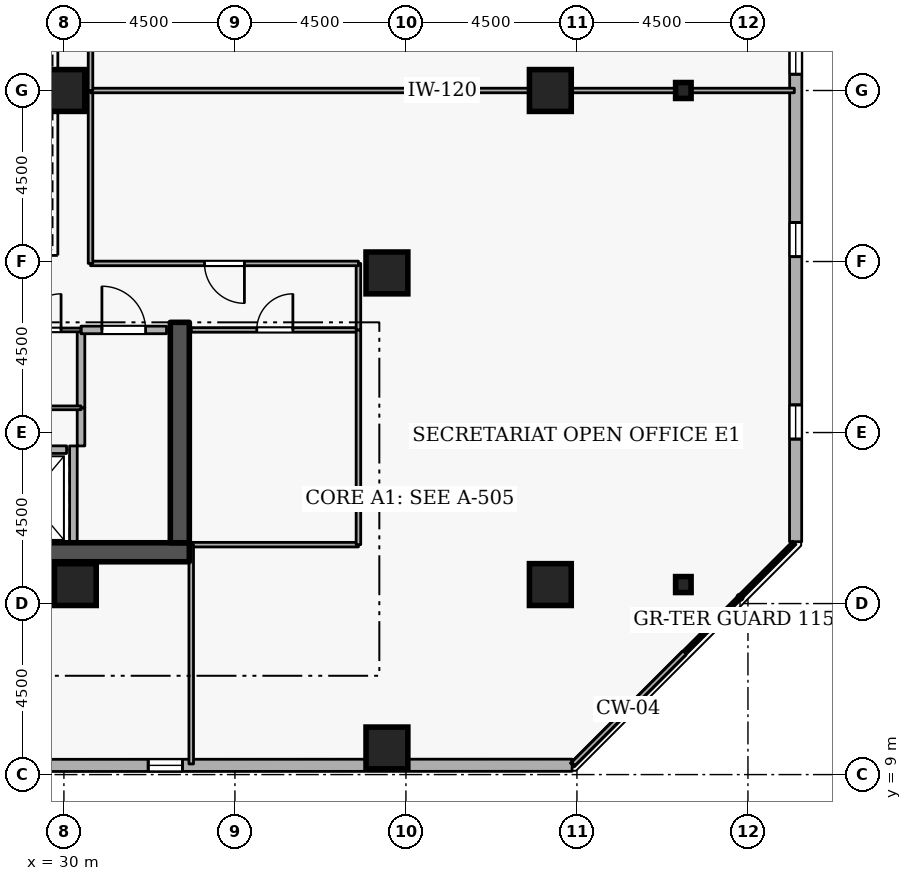
"""IFC4 building model, lengths in metres.
Left out: names, types, materials, properties, quantities, classifications, styles, units other than length and angle.
Written with IfcOpenShell. Run it as: python <this file> out.ifc"""

import sys

from ifc_helpers import new_model, si_unit, direction, frame, frame_2d, origin, origin_2d, place, context, subcontext, project, spatial, rectangle, i_section, extrude, element, fill, save


model = new_model("IFC4")
c1 = context("Model", 3, precision=1e-05, world=origin(), true_north=direction((0.0, 1.0)))
c2 = subcontext(c1, "Body", "Model", "MODEL_VIEW")
j1 = project(units=[si_unit("LENGTHUNIT", "METRE"), si_unit("PLANEANGLEUNIT", "RADIAN")], contexts=[c1])
p1 = place(None, origin())
s1 = spatial("IfcSite", under=j1, at=p1, CompositionType="ELEMENT")
p2 = place(p1, origin())
s2 = spatial("IfcBuilding", under=s1, at=p2, CompositionType="ELEMENT")
p3 = place(p2, frame((0.0, 0.0, 178.5)))
s3 = spatial("IfcBuildingStorey", under=s2, at=p3, CompositionType="ELEMENT", Elevation=178.5)
p4 = place(p3, frame((17.7, 14.85, 0.0), z_axis=(0.0, 0.0, 1.0), x_axis=(1.0, 0.0, 0.0)))
e1 = element("IfcWall", 1, at=p4, inside=s3, PredefinedType="SHEAR", context=c2, shape_type="SweptSolid", body=[
    extrude(rectangle(XDim=15.6, YDim=0.5, at=frame_2d((7.8, 0.0))), origin(), (0.0, 0.0, 1.0), 3.6),
])
p5 = place(p3, frame((33.05, 15.1, 0.0), z_axis=(0.0, 0.0, 1.0), x_axis=(0.0, 1.0, 0.0)))
e2 = element("IfcWall", 2, at=p5, inside=s3, PredefinedType="SHEAR", context=c2, shape_type="SweptSolid", body=[
    extrude(rectangle(XDim=5.8, YDim=0.5, at=frame_2d((2.9, 0.0))), origin(), (0.0, 0.0, 1.0), 3.6),
])
for number, where, z_axis, x_axis in (
    (3, (38.5, 9.7, 0.0), (0.0, 0.0, 1.0), (1.0, 0.0, 0.0)),
    (4, (42.8, 14.0, 0.0), (0.0, 0.0, 1.0), (1.0, 0.0, 0.0)),
    (5, (42.8, 27.0, 0.0), (0.0, 0.0, 1.0), (1.0, 0.0, 0.0)),
    (6, (38.5, 22.2, 0.0), (0.0, 0.0, 1.0), (1.0, 0.0, 0.0)),
    (7, (30.3, 14.0, 0.0), (0.0, 0.0, 1.0), (1.0, 0.0, 0.0)),
    (8, (30.0, 27.0, 0.0), (0.0, 0.0, 1.0), (1.0, 0.0, 0.0)),
):
    element("IfcColumn", number, at=place(p3, frame(where, z_axis=z_axis, x_axis=x_axis)), inside=s3, PredefinedType="COLUMN", context=c2, shape_type="SweptSolid", body=[
        extrude(rectangle(XDim=1.1, YDim=1.1, at=origin_2d()), origin(), (0.0, 0.0, 1.0), 3.6),
    ])
for number, where, z_axis, x_axis in (
    (9, (46.3, 14.0, 0.0), (0.0, 0.0, 1.0), (1.0, 0.0, 0.0)),
    (10, (46.3, 27.0, 0.0), (0.0, 0.0, 1.0), (1.0, 0.0, 0.0)),
):
    element("IfcColumn", number, at=place(p3, frame(where, z_axis=z_axis, x_axis=x_axis)), inside=s3, PredefinedType="COLUMN", context=c2, shape_type="SweptSolid", body=[
        extrude(i_section(OverallWidth=0.407, OverallDepth=0.419, WebThickness=0.031, FlangeThickness=0.049, FilletRadius=0.015, at=origin_2d()), origin(), (0.0, 0.0, 1.0), 3.6),
    ])
p6 = place(p3, frame((10.319, 9.235, 0.0), z_axis=(0.0, 0.0, 1.0), x_axis=(0.999999944762, 0.000332378036, 0.0)))
e11 = element("IfcWall", 11, at=p6, inside=s3, PredefinedType="STANDARD", context=c2, shape_type="SweptSolid", body=[
    extrude(rectangle(XDim=33.054, YDim=0.32, at=frame_2d((16.527, 0.0))), origin(), (0.0, 0.0, 1.0), 2.7),
])
p7 = place(p6, frame((7.5, 0.0, 0.72)))
e12 = element("IfcOpeningElement", 12, at=p7, cuts=e11, PredefinedType="OPENING", context=c2, shape_type="SweptSolid", body=[
    extrude(rectangle(XDim=0.9, YDim=1.75, at=frame_2d((0.45, 0.875))), frame((0.0, 0.17, 0.0), z_axis=(0.0, -1.0, 0.0), x_axis=(1.0, 0.0, 0.0)), (0.0, 0.0, 1.0), 0.34),
])
p8 = place(p6, frame((12.3, 0.0, 0.72)))
e13 = element("IfcOpeningElement", 13, at=p8, cuts=e11, PredefinedType="OPENING", context=c2, shape_type="SweptSolid", body=[
    extrude(rectangle(XDim=0.9, YDim=1.75, at=frame_2d((0.45, 0.875))), frame((0.0, 0.17, 0.0), z_axis=(0.0, -1.0, 0.0), x_axis=(1.0, 0.0, 0.0)), (0.0, 0.0, 1.0), 0.34),
])
p9 = place(p6, frame((17.1, 0.0, 0.72)))
e14 = element("IfcOpeningElement", 14, at=p9, cuts=e11, PredefinedType="OPENING", context=c2, shape_type="SweptSolid", body=[
    extrude(rectangle(XDim=0.9, YDim=1.75, at=frame_2d((0.45, 0.875))), frame((0.0, 0.17, 0.0), z_axis=(0.0, -1.0, 0.0), x_axis=(1.0, 0.0, 0.0)), (0.0, 0.0, 1.0), 0.34),
])
p10 = place(p6, frame((21.9, 0.0, 0.72)))
e15 = element("IfcOpeningElement", 15, at=p10, cuts=e11, PredefinedType="OPENING", context=c2, shape_type="SweptSolid", body=[
    extrude(rectangle(XDim=0.9, YDim=1.75, at=frame_2d((0.45, 0.875))), frame((0.0, 0.17, 0.0), z_axis=(0.0, -1.0, 0.0), x_axis=(1.0, 0.0, 0.0)), (0.0, 0.0, 1.0), 0.34),
])
p11 = place(p3, frame((49.254, 15.128, 0.0), z_axis=(0.0, 0.0, 1.0), x_axis=(0.000332378036, 0.999999944762, 0.0)))
e16 = element("IfcWall", 16, at=p11, inside=s3, PredefinedType="STANDARD", context=c2, shape_type="SweptSolid", body=[
    extrude(rectangle(XDim=33.054, YDim=0.32, at=frame_2d((16.527, 0.0))), origin(), (0.0, 0.0, 1.0), 2.7),
])
p12 = place(p11, frame((2.7, 0.0, 0.72)))
e17 = element("IfcOpeningElement", 17, at=p12, cuts=e16, PredefinedType="OPENING", context=c2, shape_type="SweptSolid", body=[
    extrude(rectangle(XDim=0.9, YDim=1.75, at=frame_2d((0.45, 0.875))), frame((0.0, 0.17, 0.0), z_axis=(0.0, -1.0, 0.0), x_axis=(1.0, 0.0, 0.0)), (0.0, 0.0, 1.0), 0.34),
])
p13 = place(p11, frame((7.5, 0.0, 0.72)))
e18 = element("IfcOpeningElement", 18, at=p13, cuts=e16, PredefinedType="OPENING", context=c2, shape_type="SweptSolid", body=[
    extrude(rectangle(XDim=0.9, YDim=1.75, at=frame_2d((0.45, 0.875))), frame((0.0, 0.17, 0.0), z_axis=(0.0, -1.0, 0.0), x_axis=(1.0, 0.0, 0.0)), (0.0, 0.0, 1.0), 0.34),
])
p14 = place(p11, frame((12.3, 0.0, 0.72)))
e19 = element("IfcOpeningElement", 19, at=p14, cuts=e16, PredefinedType="OPENING", context=c2, shape_type="SweptSolid", body=[
    extrude(rectangle(XDim=0.9, YDim=1.75, at=frame_2d((0.45, 0.875))), frame((0.0, 0.17, 0.0), z_axis=(0.0, -1.0, 0.0), x_axis=(1.0, 0.0, 0.0)), (0.0, 0.0, 1.0), 0.34),
])
p15 = place(p11, frame((17.1, 0.0, 0.72)))
e20 = element("IfcOpeningElement", 20, at=p15, cuts=e16, PredefinedType="OPENING", context=c2, shape_type="SweptSolid", body=[
    extrude(rectangle(XDim=0.9, YDim=1.75, at=frame_2d((0.45, 0.875))), frame((0.0, 0.17, 0.0), z_axis=(0.0, -1.0, 0.0), x_axis=(1.0, 0.0, 0.0)), (0.0, 0.0, 1.0), 0.34),
])
p16 = place(p11, frame((21.9, 0.0, 0.72)))
e21 = element("IfcOpeningElement", 21, at=p16, cuts=e16, PredefinedType="OPENING", context=c2, shape_type="SweptSolid", body=[
    extrude(rectangle(XDim=0.9, YDim=1.75, at=frame_2d((0.45, 0.875))), frame((0.0, 0.17, 0.0), z_axis=(0.0, -1.0, 0.0), x_axis=(1.0, 0.0, 0.0)), (0.0, 0.0, 1.0), 0.34),
])
p17 = place(p11, frame((26.7, 0.0, 0.72)))
e22 = element("IfcOpeningElement", 22, at=p17, cuts=e16, PredefinedType="OPENING", context=c2, shape_type="SweptSolid", body=[
    extrude(rectangle(XDim=0.9, YDim=1.75, at=frame_2d((0.45, 0.875))), frame((0.0, 0.17, 0.0), z_axis=(0.0, -1.0, 0.0), x_axis=(1.0, 0.0, 0.0)), (0.0, 0.0, 1.0), 0.34),
])
p18 = place(p3, frame((28.08, 17.55, 0.0), z_axis=(0.0, 0.0, 1.0), x_axis=(1.0, 0.0, 0.0)))
e23 = element("IfcWall", 23, at=p18, inside=s3, PredefinedType="STANDARD", context=c2, shape_type="SweptSolid", body=[
    extrude(rectangle(XDim=1.99, YDim=0.2, at=frame_2d((0.995, 0.0))), origin(), (0.0, 0.0, 1.0), 3.34),
])
p19 = place(p18, frame((0.485, 0.0, 0.0)))
e24 = element("IfcOpeningElement", 24, at=p19, cuts=e23, PredefinedType="OPENING", context=c2, shape_type="SweptSolid", body=[
    extrude(rectangle(XDim=1.02, YDim=2.06, at=frame_2d((0.51, 1.03))), frame((0.0, 0.11, 0.0), z_axis=(0.0, -1.0, 0.0), x_axis=(1.0, 0.0, 0.0)), (0.0, 0.0, 1.0), 0.22),
])
p20 = place(p3, frame((30.25, 15.112, 0.0), z_axis=(0.0, 0.0, 1.0), x_axis=(0.0, 1.0, 0.0)))
e25 = element("IfcWall", 25, at=p20, inside=s3, PredefinedType="STANDARD", context=c2, shape_type="SweptSolid", body=[
    extrude(rectangle(XDim=2.536, YDim=0.2, at=frame_2d((1.268, 0.0))), origin(), (0.0, 0.0, 1.0), 3.34),
])
p21 = place(p3, frame((30.45, 17.648, 0.0), z_axis=(0.0, 0.0, 1.0), x_axis=(0.0, 1.0, 0.0)))
e26 = element("IfcWall", 26, at=p21, inside=s3, PredefinedType="STANDARD", context=c2, shape_type="SweptSolid", body=[
    extrude(rectangle(XDim=1.002, YDim=0.2, at=frame_2d((0.501, 0.0))), origin(), (0.0, 0.0, 1.0), 3.34),
])
p22 = place(p3, frame((30.45, 18.65, 0.0), z_axis=(0.0, 0.0, 1.0), x_axis=(0.0, 1.0, 0.0)))
e27 = element("IfcWall", 27, at=p22, inside=s3, PredefinedType="STANDARD", context=c2, shape_type="SweptSolid", body=[
    extrude(rectangle(XDim=2.05, YDim=0.2, at=frame_2d((1.025, 0.0))), origin(), (0.0, 0.0, 1.0), 3.34),
])
p23 = place(p3, frame((30.45, 20.7, 0.0), z_axis=(0.0, 0.0, 1.0), x_axis=(1.0, 0.0, 0.0)))
e28 = element("IfcWall", 28, at=p23, inside=s3, PredefinedType="STANDARD", context=c2, shape_type="SweptSolid", body=[
    extrude(rectangle(XDim=2.25, YDim=0.2, at=frame_2d((1.125, 0.0))), origin(), (0.0, 0.0, 1.0), 3.34),
])
p24 = place(p23, frame((0.55, 0.0, 0.0)))
e29 = element("IfcOpeningElement", 29, at=p24, cuts=e28, PredefinedType="OPENING", context=c2, shape_type="SweptSolid", body=[
    extrude(rectangle(XDim=1.15, YDim=2.1, at=frame_2d((0.575, 1.05))), frame((0.0, 0.11, 0.0), z_axis=(0.0, -1.0, 0.0), x_axis=(1.0, 0.0, 0.0)), (0.0, 0.0, 1.0), 0.22),
])
p25 = place(p3, frame((30.45, 18.65, 0.0), z_axis=(0.0, 0.0, 1.0), x_axis=(-1.0, 0.0, 0.0)))
e30 = element("IfcWall", 30, at=p25, inside=s3, PredefinedType="PARTITIONING", context=c2, shape_type="SweptSolid", body=[
    extrude(rectangle(XDim=2.0, YDim=0.1, at=frame_2d((1.0, 0.0))), origin(), (0.0, 0.0, 1.0), 3.34),
])
p26 = place(p3, frame((28.45, 20.7, 0.0), z_axis=(0.0, 0.0, 1.0), x_axis=(1.0, 0.0, 0.0)))
e31 = element("IfcWall", 31, at=p26, inside=s3, PredefinedType="PARTITIONING", context=c2, shape_type="SweptSolid", body=[
    extrude(rectangle(XDim=2.0, YDim=0.1, at=frame_2d((1.0, 0.0))), origin(), (0.0, 0.0, 1.0), 3.34),
])
p27 = place(p26, frame((0.525, 0.0, 0.0)))
e32 = element("IfcOpeningElement", 32, at=p27, cuts=e31, PredefinedType="OPENING", context=c2, shape_type="SweptSolid", body=[
    extrude(rectangle(XDim=0.95, YDim=2.1, at=frame_2d((0.475, 1.05))), frame((0.0, 0.06, 0.0), z_axis=(0.0, -1.0, 0.0), x_axis=(1.0, 0.0, 0.0)), (0.0, 0.0, 1.0), 0.12),
])
p28 = place(p3, frame((37.75, 15.05, 0.0), z_axis=(0.0, 0.0, 1.0), x_axis=(-1.0, 0.0, 0.0)))
e33 = element("IfcWall", 33, at=p28, inside=s3, PredefinedType="PARTITIONING", context=c2, shape_type="SweptSolid", body=[
    extrude(rectangle(XDim=4.4, YDim=0.12, at=frame_2d((2.2, 0.0))), origin(), (0.0, 0.0, 1.0), 3.34),
])
p29 = place(p3, frame((33.35, 20.7, 0.0), z_axis=(0.0, 0.0, 1.0), x_axis=(1.0, 0.0, 0.0)))
e34 = element("IfcWall", 34, at=p29, inside=s3, PredefinedType="PARTITIONING", context=c2, shape_type="SweptSolid", body=[
    extrude(rectangle(XDim=4.4, YDim=0.12, at=frame_2d((2.2, 0.0))), origin(), (0.0, 0.0, 1.0), 3.34),
])
p30 = place(p29, frame((1.725, 0.0, 0.0)))
e35 = element("IfcOpeningElement", 35, at=p30, cuts=e34, PredefinedType="OPENING", context=c2, shape_type="SweptSolid", body=[
    extrude(rectangle(XDim=0.95, YDim=2.1, at=frame_2d((0.475, 1.05))), frame((0.0, 0.07, 0.0), z_axis=(0.0, -1.0, 0.0), x_axis=(1.0, 0.0, 0.0)), (0.0, 0.0, 1.0), 0.14),
])
p31 = place(p3, frame((37.75, 20.7, 0.0), z_axis=(0.0, 0.0, 1.0), x_axis=(0.0, -1.0, 0.0)))
e36 = element("IfcWall", 36, at=p31, inside=s3, PredefinedType="PARTITIONING", context=c2, shape_type="SweptSolid", body=[
    extrude(rectangle(XDim=5.65, YDim=0.12, at=frame_2d((2.825, 0.0))), origin(), (0.0, 0.0, 1.0), 3.34),
])
p32 = place(p3, frame((37.75, 20.7, 0.0), z_axis=(0.0, 0.0, 1.0), x_axis=(0.0, 1.0, 0.0)))
e37 = element("IfcWall", 37, at=p32, inside=s3, PredefinedType="PARTITIONING", context=c2, shape_type="SweptSolid", body=[
    extrude(rectangle(XDim=1.75, YDim=0.12, at=frame_2d((0.875, 0.0))), origin(), (0.0, 0.0, 1.0), 3.34),
])
p33 = place(p3, frame((37.75, 22.45, 0.0), z_axis=(0.0, 0.0, 1.0), x_axis=(-1.0, 0.0, 0.0)))
e38 = element("IfcWall", 38, at=p33, inside=s3, PredefinedType="PARTITIONING", context=c2, shape_type="SweptSolid", body=[
    extrude(rectangle(XDim=7.05, YDim=0.12, at=frame_2d((3.525, 0.0))), origin(), (0.0, 0.0, 1.0), 3.34),
])
p34 = place(p33, frame((3.0, 0.0, 0.0)))
e39 = element("IfcOpeningElement", 39, at=p34, cuts=e38, PredefinedType="OPENING", context=c2, shape_type="SweptSolid", body=[
    extrude(rectangle(XDim=1.05, YDim=2.1, at=frame_2d((0.525, 1.05))), frame((0.0, 0.07, 0.0), z_axis=(0.0, -1.0, 0.0), x_axis=(1.0, 0.0, 0.0)), (0.0, 0.0, 1.0), 0.14),
])
p35 = place(p3, frame((30.7, 22.45, 0.0), z_axis=(0.0, 0.0, 1.0), x_axis=(0.0, 1.0, 0.0)))
e40 = element("IfcWall", 40, at=p35, inside=s3, PredefinedType="PARTITIONING", context=c2, shape_type="SweptSolid", body=[
    extrude(rectangle(XDim=4.55, YDim=0.12, at=frame_2d((2.275, 0.0))), origin(), (0.0, 0.0, 1.0), 3.34),
])
p36 = place(p3, frame((30.7, 27.0, 0.0), z_axis=(0.0, 0.0, 1.0), x_axis=(1.0, 0.0, 0.0)))
e41 = element("IfcWall", 41, at=p36, inside=s3, PredefinedType="PARTITIONING", context=c2, shape_type="SweptSolid", body=[
    extrude(rectangle(XDim=18.52, YDim=0.12, at=frame_2d((9.26, 0.0))), origin(), (0.0, 0.0, 1.0), 2.932),
])
p37 = place(p3, frame((49.22, 15.098, 0.0), z_axis=(0.0, 0.0, 1.0), x_axis=(-0.707106781187, -0.707106781187, 0.0)))
e42 = element("IfcWall", 42, at=p37, inside=s3, PredefinedType="PARTITIONING", context=c2, shape_type="SweptSolid", body=[
    extrude(rectangle(XDim=8.227, YDim=0.12, at=frame_2d((4.114, 0.0))), origin(), (0.0, 0.0, 1.0), 3.34),
])
p38 = place(p3, frame((33.35, 9.28, 0.0), z_axis=(0.0, 0.0, 1.0), x_axis=(0.0, 1.0, 0.0)))
e43 = element("IfcWall", 43, at=p38, inside=s3, PredefinedType="PARTITIONING", context=c2, shape_type="SweptSolid", body=[
    extrude(rectangle(XDim=5.77, YDim=0.12, at=frame_2d((2.885, 0.0))), origin(), (0.0, 0.0, 1.0), 2.545),
])
p39 = place(p3, frame((30.7, 27.0, 0.0), z_axis=(0.0, 0.0, 1.0), x_axis=(0.0, 1.0, 0.0)))
e44 = element("IfcWall", 44, at=p39, inside=s3, PredefinedType="PARTITIONING", context=c2, shape_type="SweptSolid", body=[
    extrude(rectangle(XDim=4.55, YDim=0.12, at=frame_2d((2.275, 0.0))), origin(), (0.0, 0.0, 1.0), 3.34),
])
p40 = place(p10, origin())
e45 = element("IfcWindow", 45, at=p40, inside=s3, PartitioningType="SINGLE_PANEL", PredefinedType="WINDOW", context=c2, shape_type="SweptSolid", body=[
    extrude(rectangle(XDim=0.9, YDim=1.75, at=frame_2d((0.45, 0.875))), frame((0.0, 0.03, 0.0), z_axis=(0.0, -1.0, 0.0), x_axis=(1.0, 0.0, 0.0)), (0.0, 0.0, 1.0), 0.06),
])
fill(e15, e45)
p41 = place(p12, origin())
e46 = element("IfcWindow", 46, at=p41, inside=s3, PartitioningType="SINGLE_PANEL", PredefinedType="WINDOW", context=c2, shape_type="SweptSolid", body=[
    extrude(rectangle(XDim=0.9, YDim=1.75, at=frame_2d((0.45, 0.875))), frame((0.0, 0.03, 0.0), z_axis=(0.0, -1.0, 0.0), x_axis=(1.0, 0.0, 0.0)), (0.0, 0.0, 1.0), 0.06),
])
fill(e17, e46)
p42 = place(p13, origin())
e47 = element("IfcWindow", 47, at=p42, inside=s3, PartitioningType="SINGLE_PANEL", PredefinedType="WINDOW", context=c2, shape_type="SweptSolid", body=[
    extrude(rectangle(XDim=0.9, YDim=1.75, at=frame_2d((0.45, 0.875))), frame((0.0, 0.03, 0.0), z_axis=(0.0, -1.0, 0.0), x_axis=(1.0, 0.0, 0.0)), (0.0, 0.0, 1.0), 0.06),
])
fill(e18, e47)
p43 = place(p14, origin())
e48 = element("IfcWindow", 48, at=p43, inside=s3, PartitioningType="SINGLE_PANEL", PredefinedType="WINDOW", context=c2, shape_type="SweptSolid", body=[
    extrude(rectangle(XDim=0.9, YDim=1.75, at=frame_2d((0.45, 0.875))), frame((0.0, 0.03, 0.0), z_axis=(0.0, -1.0, 0.0), x_axis=(1.0, 0.0, 0.0)), (0.0, 0.0, 1.0), 0.06),
])
fill(e19, e48)
p44 = place(p27, origin())
e49 = element("IfcDoor", 49, at=p44, inside=s3, OperationType="SINGLE_SWING_RIGHT", PredefinedType="DOOR", context=c2, shape_type="SweptSolid", body=[
    extrude(rectangle(XDim=0.95, YDim=2.1, at=frame_2d((0.475, 1.05))), frame((0.0, 0.025, 0.0), z_axis=(0.0, -1.0, 0.0), x_axis=(1.0, 0.0, 0.0)), (0.0, 0.0, 1.0), 0.05),
])
fill(e32, e49)
p45 = place(p24, origin())
e50 = element("IfcDoor", 50, at=p45, inside=s3, OperationType="SINGLE_SWING_LEFT", PredefinedType="DOOR", context=c2, shape_type="SweptSolid", body=[
    extrude(rectangle(XDim=1.15, YDim=2.1, at=frame_2d((0.575, 1.05))), frame((0.0, 0.025, 0.0), z_axis=(0.0, -1.0, 0.0), x_axis=(1.0, 0.0, 0.0)), (0.0, 0.0, 1.0), 0.05),
])
fill(e29, e50)
p46 = place(p30, origin())
e51 = element("IfcDoor", 51, at=p46, inside=s3, OperationType="SINGLE_SWING_RIGHT", PredefinedType="DOOR", context=c2, shape_type="SweptSolid", body=[
    extrude(rectangle(XDim=0.95, YDim=2.1, at=frame_2d((0.475, 1.05))), frame((0.0, 0.025, 0.0), z_axis=(0.0, -1.0, 0.0), x_axis=(1.0, 0.0, 0.0)), (0.0, 0.0, 1.0), 0.05),
])
fill(e35, e51)
p47 = place(p34, origin())
e52 = element("IfcDoor", 52, at=p47, inside=s3, OperationType="SINGLE_SWING_LEFT", PredefinedType="DOOR", context=c2, shape_type="SweptSolid", body=[
    extrude(rectangle(XDim=1.05, YDim=2.1, at=frame_2d((0.525, 1.05))), frame((0.0, 0.025, 0.0), z_axis=(0.0, -1.0, 0.0), x_axis=(1.0, 0.0, 0.0)), (0.0, 0.0, 1.0), 0.05),
])
fill(e39, e52)
save(model, sys.argv[1])
